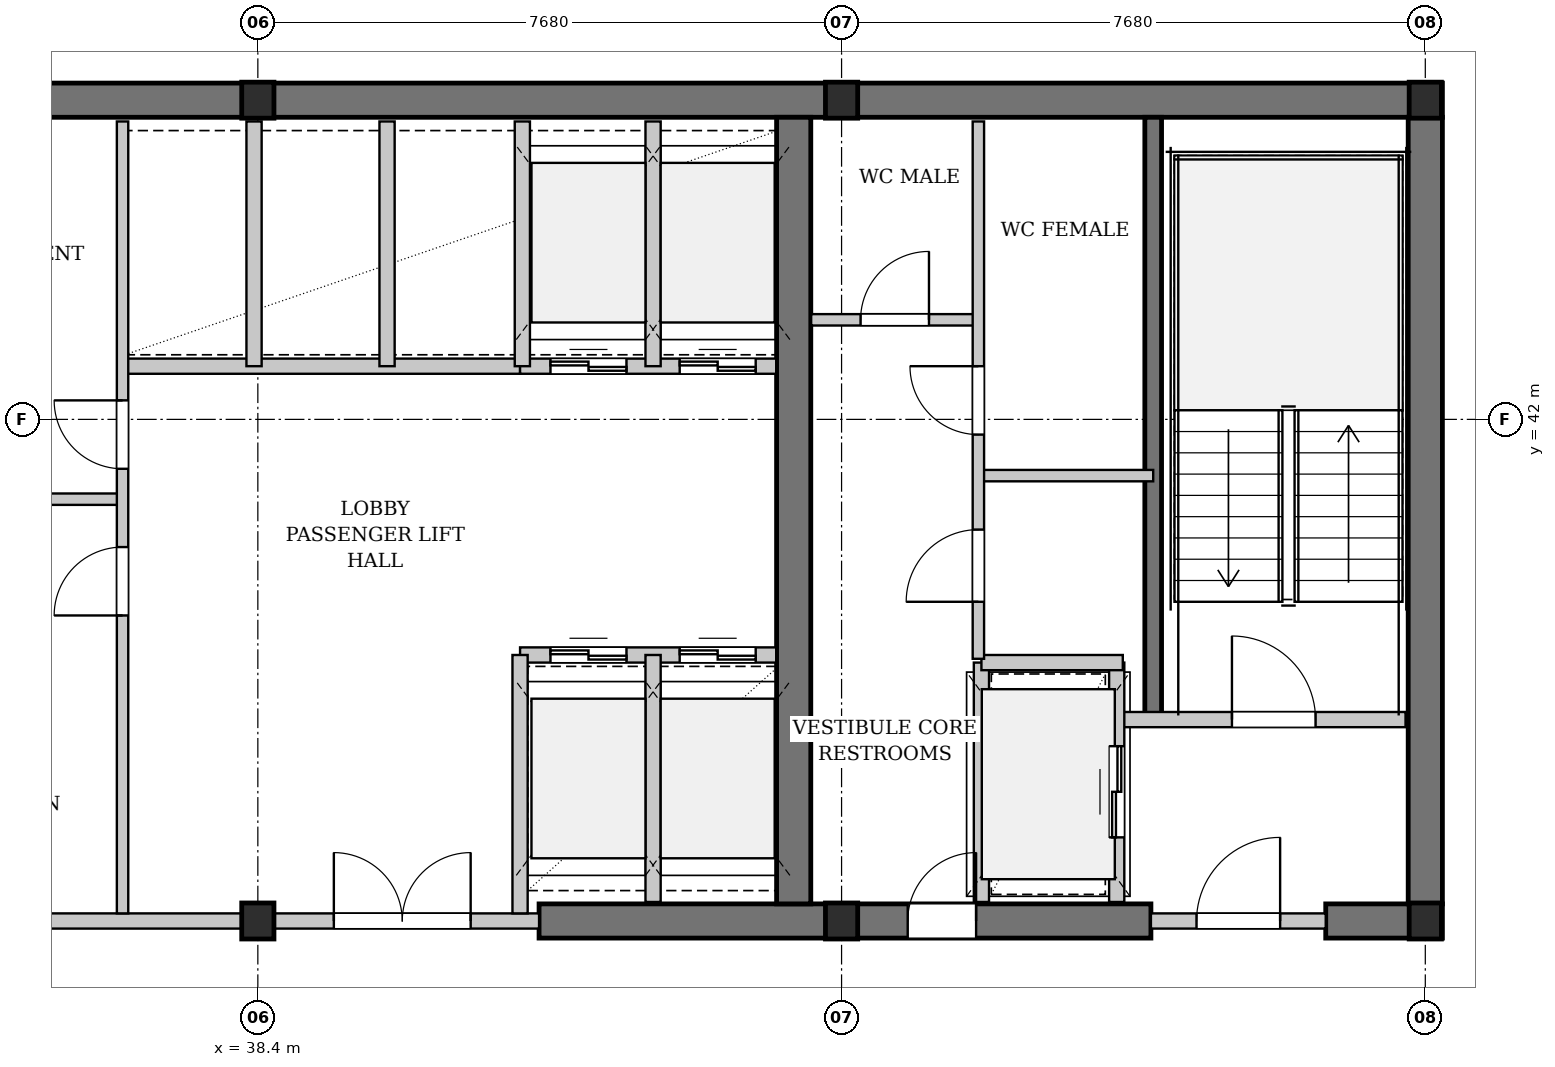
"""IFC4 building model, lengths in metres.
Left out: names, types, materials, properties, quantities, classifications, styles, units other than length and angle.
Written with IfcOpenShell. Run it as: python <this file> out.ifc"""

import sys

from ifc_helpers import new_model, si_unit, direction, frame, frame_2d, origin, origin_2d, place, context, subcontext, project, spatial, rectangle, i_section, extrude, element, fill, save


model = new_model("IFC4")
c1 = context("Model", 3, precision=1e-05, world=origin(), true_north=direction((0.0, 1.0)))
c2 = subcontext(c1, "Body", "Model", "MODEL_VIEW")
j1 = project(units=[si_unit("LENGTHUNIT", "METRE"), si_unit("PLANEANGLEUNIT", "RADIAN")], contexts=[c1])
p1 = place(None, origin())
s1 = spatial("IfcSite", under=j1, at=p1, CompositionType="ELEMENT")
p2 = place(p1, origin())
s2 = spatial("IfcBuilding", under=s1, at=p2, CompositionType="ELEMENT")
p3 = place(p2, frame((0.0, 0.0, 113.5)))
s3 = spatial("IfcBuildingStorey", under=s2, at=p3, CompositionType="ELEMENT", Elevation=113.5)
p4 = place(p3, frame((22.815, 46.2, 0.0), z_axis=(0.0, 0.0, 1.0), x_axis=(1.0, 0.0, 0.0)))
e1 = element("IfcWall", 1, at=p4, inside=s3, PredefinedType="SHEAR", context=c2, shape_type="SweptSolid", body=[
    extrude(rectangle(XDim=31.17, YDim=0.45, at=frame_2d((15.585, 0.0))), origin(), (0.0, 0.0, 1.0), 3.18),
])
p5 = place(p3, frame((42.1, 35.4, 0.0), z_axis=(0.0, 0.0, 1.0), x_axis=(1.0, 0.0, 0.0)))
e2 = element("IfcWall", 2, at=p5, inside=s3, PredefinedType="SHEAR", context=c2, shape_type="SweptSolid", body=[
    extrude(rectangle(XDim=8.05, YDim=0.45, at=frame_2d((4.025, 0.0))), origin(), (0.0, 0.0, 1.0), 3.18),
])
p6 = place(p5, frame((4.85, 0.0, 0.0)))
e3 = element("IfcOpeningElement", 3, at=p6, cuts=e2, PredefinedType="OPENING", context=c2, shape_type="SweptSolid", body=[
    extrude(rectangle(XDim=0.9, YDim=2.15, at=frame_2d((0.45, 1.075))), frame((0.0, 0.235, 0.0), z_axis=(0.0, -1.0, 0.0), x_axis=(1.0, 0.0, 0.0)), (0.0, 0.0, 1.0), 0.47),
])
p7 = place(p3, frame((52.45, 35.4, 0.0), z_axis=(0.0, 0.0, 1.0), x_axis=(1.0, 0.0, 0.0)))
e4 = element("IfcWall", 4, at=p7, inside=s3, PredefinedType="SHEAR", context=c2, shape_type="SweptSolid", body=[
    extrude(rectangle(XDim=1.535, YDim=0.45, at=frame_2d((0.768, 0.0))), origin(), (0.0, 0.0, 1.0), 3.18),
])
for number, where, z_axis, x_axis in (
    (5, (45.45, 35.625, 0.0), (0.0, 0.0, 1.0), (0.0, 1.0, 0.0)),
    (6, (53.76, 35.625, 0.0), (0.0, 0.0, 1.0), (0.0, 1.0, 0.0)),
):
    element("IfcWall", number, at=place(p3, frame(where, z_axis=z_axis, x_axis=x_axis)), inside=s3, PredefinedType="SHEAR", context=c2, shape_type="SweptSolid", body=[
        extrude(rectangle(XDim=10.35, YDim=0.45, at=frame_2d((5.175, 0.0))), origin(), (0.0, 0.0, 1.0), 3.18),
    ])
p8 = place(p3, frame((50.18, 38.05, 0.0), z_axis=(0.0, 0.0, 1.0), x_axis=(0.0, 1.0, 0.0)))
e7 = element("IfcWall", 7, at=p8, inside=s3, PredefinedType="SHEAR", context=c2, shape_type="SweptSolid", body=[
    extrude(rectangle(XDim=7.925, YDim=0.22, at=frame_2d((3.962, 0.0))), origin(), (0.0, 0.0, 1.0), 3.18),
])
for number, where, z_axis, x_axis in (
    (8, (38.4, 35.4, 0.0), (0.0, 0.0, 1.0), (1.0, 0.0, 0.0)),
    (9, (38.4, 46.2, 0.0), (0.0, 0.0, 1.0), (1.0, 0.0, 0.0)),
    (10, (46.08, 35.4, 0.0), (0.0, 0.0, 1.0), (1.0, 0.0, 0.0)),
    (11, (46.08, 46.2, 0.0), (0.0, 0.0, 1.0), (1.0, 0.0, 0.0)),
    (12, (53.76, 35.4, 0.0), (0.0, 0.0, 1.0), (1.0, 0.0, 0.0)),
    (13, (53.76, 46.2, 0.0), (0.0, 0.0, 1.0), (1.0, 0.0, 0.0)),
):
    element("IfcColumn", number, at=place(p3, frame(where, z_axis=z_axis, x_axis=x_axis)), inside=s3, PredefinedType="COLUMN", context=c2, shape_type="SweptSolid", body=[
        extrude(i_section(OverallWidth=0.424, OverallDepth=0.474, WebThickness=0.047, FlangeThickness=0.077, FilletRadius=0.015, at=origin_2d()), origin(), (0.0, 0.0, 1.0), 3.4),
    ])
p9 = place(p3, frame((35.6, 35.4, 0.0), z_axis=(0.0, 0.0, 1.0), x_axis=(1.0, 0.0, 0.0)))
e14 = element("IfcWall", 14, at=p9, inside=s3, PredefinedType="PARTITIONING", context=c2, shape_type="SweptSolid", body=[
    extrude(rectangle(XDim=6.5, YDim=0.2, at=frame_2d((3.25, 0.0))), origin(), (0.0, 0.0, 1.0), 2.525),
])
p10 = place(p9, frame((3.8, 0.0, 0.0)))
e15 = element("IfcOpeningElement", 15, at=p10, cuts=e14, PredefinedType="OPENING", context=c2, shape_type="SweptSolid", body=[
    extrude(rectangle(XDim=1.8, YDim=2.3, at=frame_2d((0.9, 1.15))), frame((0.0, 0.11, 0.0), z_axis=(0.0, -1.0, 0.0), x_axis=(1.0, 0.0, 0.0)), (0.0, 0.0, 1.0), 0.22),
])
p11 = place(p3, frame((36.6, 42.7, 0.0), z_axis=(0.0, 0.0, 1.0), x_axis=(1.0, 0.0, 0.0)))
e16 = element("IfcWall", 16, at=p11, inside=s3, PredefinedType="PARTITIONING", context=c2, shape_type="SweptSolid", body=[
    extrude(rectangle(XDim=5.25, YDim=0.2, at=frame_2d((2.625, 0.0))), origin(), (0.0, 0.0, 1.0), 3.18),
])
p12 = place(p3, frame((38.35, 42.7, 0.0), z_axis=(0.0, 0.0, 1.0), x_axis=(0.0, 1.0, 0.0)))
e17 = element("IfcWall", 17, at=p12, inside=s3, PredefinedType="PARTITIONING", context=c2, shape_type="SweptSolid", body=[
    extrude(rectangle(XDim=3.22, YDim=0.2, at=frame_2d((1.61, 0.0))), origin(), (0.0, 0.0, 1.0), 2.525),
])
p13 = place(p3, frame((40.1, 42.7, 0.0), z_axis=(0.0, 0.0, 1.0), x_axis=(0.0, 1.0, 0.0)))
e18 = element("IfcWall", 18, at=p13, inside=s3, PredefinedType="PARTITIONING", context=c2, shape_type="SweptSolid", body=[
    extrude(rectangle(XDim=3.22, YDim=0.2, at=frame_2d((1.61, 0.0))), origin(), (0.0, 0.0, 1.0), 3.18),
])
p14 = place(p3, frame((33.05, 40.95, 0.0), z_axis=(0.0, 0.0, 1.0), x_axis=(1.0, 0.0, 0.0)))
e19 = element("IfcWall", 19, at=p14, inside=s3, PredefinedType="PARTITIONING", context=c2, shape_type="SweptSolid", body=[
    extrude(rectangle(XDim=3.57, YDim=0.15, at=frame_2d((1.785, 0.0))), origin(), (0.0, 0.0, 1.0), 3.18),
])
p15 = place(p3, frame((36.62, 35.5, 0.0), z_axis=(0.0, 0.0, 1.0), x_axis=(0.0, 1.0, 0.0)))
e20 = element("IfcWall", 20, at=p15, inside=s3, PredefinedType="PARTITIONING", context=c2, shape_type="SweptSolid", body=[
    extrude(rectangle(XDim=10.42, YDim=0.15, at=frame_2d((5.21, 0.0))), origin(), (0.0, 0.0, 1.0), 3.18),
])
p16 = place(p15, frame((3.92, 0.0, 0.0)))
e21 = element("IfcOpeningElement", 21, at=p16, cuts=e20, PredefinedType="OPENING", context=c2, shape_type="SweptSolid", body=[
    extrude(rectangle(XDim=0.9, YDim=2.15, at=frame_2d((0.45, 1.075))), frame((0.0, 0.085, 0.0), z_axis=(0.0, -1.0, 0.0), x_axis=(1.0, 0.0, 0.0)), (0.0, 0.0, 1.0), 0.17),
])
p17 = place(p15, frame((5.85, 0.0, 0.0)))
e22 = element("IfcOpeningElement", 22, at=p17, cuts=e20, PredefinedType="OPENING", context=c2, shape_type="SweptSolid", body=[
    extrude(rectangle(XDim=0.9, YDim=2.15, at=frame_2d((0.45, 1.075))), frame((0.0, 0.085, 0.0), z_axis=(0.0, -1.0, 0.0), x_axis=(1.0, 0.0, 0.0)), (0.0, 0.0, 1.0), 0.17),
])
p18 = place(p3, frame((41.85, 38.9, 0.0), z_axis=(0.0, 0.0, 1.0), x_axis=(1.0, 0.0, 0.0)))
e23 = element("IfcWall", 23, at=p18, inside=s3, PredefinedType="PARTITIONING", context=c2, shape_type="SweptSolid", body=[
    extrude(rectangle(XDim=3.37, YDim=0.2, at=frame_2d((1.685, 0.0))), origin(), (0.0, 0.0, 1.0), 3.18),
])
p19 = place(p18, frame((0.4, 0.0, 0.0)))
e24 = element("IfcOpeningElement", 24, at=p19, cuts=e23, PredefinedType="OPENING", context=c2, shape_type="SweptSolid", body=[
    extrude(rectangle(XDim=1.0, YDim=2.2, at=frame_2d((0.5, 1.1))), frame((0.0, 0.11, 0.0), z_axis=(0.0, -1.0, 0.0), x_axis=(1.0, 0.0, 0.0)), (0.0, 0.0, 1.0), 0.22),
])
p20 = place(p18, frame((2.1, 0.0, 0.0)))
e25 = element("IfcOpeningElement", 25, at=p20, cuts=e23, PredefinedType="OPENING", context=c2, shape_type="SweptSolid", body=[
    extrude(rectangle(XDim=1.0, YDim=2.2, at=frame_2d((0.5, 1.1))), frame((0.0, 0.11, 0.0), z_axis=(0.0, -1.0, 0.0), x_axis=(1.0, 0.0, 0.0)), (0.0, 0.0, 1.0), 0.22),
])
p21 = place(p3, frame((41.85, 42.7, 0.0), z_axis=(0.0, 0.0, 1.0), x_axis=(1.0, 0.0, 0.0)))
e26 = element("IfcWall", 26, at=p21, inside=s3, PredefinedType="PARTITIONING", context=c2, shape_type="SweptSolid", body=[
    extrude(rectangle(XDim=3.37, YDim=0.2, at=frame_2d((1.685, 0.0))), origin(), (0.0, 0.0, 1.0), 3.18),
])
p22 = place(p21, frame((0.4, 0.0, 0.0)))
e27 = element("IfcOpeningElement", 27, at=p22, cuts=e26, PredefinedType="OPENING", context=c2, shape_type="SweptSolid", body=[
    extrude(rectangle(XDim=1.0, YDim=2.2, at=frame_2d((0.5, 1.1))), frame((0.0, 0.11, 0.0), z_axis=(0.0, -1.0, 0.0), x_axis=(1.0, 0.0, 0.0)), (0.0, 0.0, 1.0), 0.22),
])
p23 = place(p21, frame((2.1, 0.0, 0.0)))
e28 = element("IfcOpeningElement", 28, at=p23, cuts=e26, PredefinedType="OPENING", context=c2, shape_type="SweptSolid", body=[
    extrude(rectangle(XDim=1.0, YDim=2.2, at=frame_2d((0.5, 1.1))), frame((0.0, 0.11, 0.0), z_axis=(0.0, -1.0, 0.0), x_axis=(1.0, 0.0, 0.0)), (0.0, 0.0, 1.0), 0.22),
])
p24 = place(p3, frame((43.6, 35.65, 0.0), z_axis=(0.0, 0.0, 1.0), x_axis=(0.0, 1.0, 0.0)))
e29 = element("IfcWall", 29, at=p24, inside=s3, PredefinedType="PARTITIONING", context=c2, shape_type="SweptSolid", body=[
    extrude(rectangle(XDim=3.25, YDim=0.2, at=frame_2d((1.625, 0.0))), origin(), (0.0, 0.0, 1.0), 3.18),
])
p25 = place(p3, frame((43.6, 42.7, 0.0), z_axis=(0.0, 0.0, 1.0), x_axis=(0.0, 1.0, 0.0)))
e30 = element("IfcWall", 30, at=p25, inside=s3, PredefinedType="PARTITIONING", context=c2, shape_type="SweptSolid", body=[
    extrude(rectangle(XDim=3.22, YDim=0.2, at=frame_2d((1.61, 0.0))), origin(), (0.0, 0.0, 1.0), 3.18),
])
p26 = place(p3, frame((41.85, 35.5, 0.0), z_axis=(0.0, 0.0, 1.0), x_axis=(0.0, 1.0, 0.0)))
e31 = element("IfcWall", 31, at=p26, inside=s3, PredefinedType="PARTITIONING", context=c2, shape_type="SweptSolid", body=[
    extrude(rectangle(XDim=3.4, YDim=0.2, at=frame_2d((1.7, 0.0))), origin(), (0.0, 0.0, 1.0), 3.18),
])
p27 = place(p3, frame((41.88, 42.7, 0.0), z_axis=(0.0, 0.0, 1.0), x_axis=(0.0, 1.0, 0.0)))
e32 = element("IfcWall", 32, at=p27, inside=s3, PredefinedType="PARTITIONING", context=c2, shape_type="SweptSolid", body=[
    extrude(rectangle(XDim=3.22, YDim=0.2, at=frame_2d((1.61, 0.0))), origin(), (0.0, 0.0, 1.0), 3.18),
])
p28 = place(p3, frame((49.78, 38.05, 0.0), z_axis=(0.0, 0.0, 1.0), x_axis=(1.0, 0.0, 0.0)))
e33 = element("IfcWall", 33, at=p28, inside=s3, PredefinedType="PARTITIONING", context=c2, shape_type="SweptSolid", body=[
    extrude(rectangle(XDim=3.72, YDim=0.2, at=frame_2d((1.86, 0.0))), origin(), (0.0, 0.0, 1.0), 3.18),
])
p29 = place(p28, frame((1.436, 0.0, 0.0)))
e34 = element("IfcOpeningElement", 34, at=p29, cuts=e33, PredefinedType="OPENING", context=c2, shape_type="SweptSolid", body=[
    extrude(rectangle(XDim=1.1, YDim=2.15, at=frame_2d((0.55, 1.075))), frame((0.0, 0.11, 0.0), z_axis=(0.0, -1.0, 0.0), x_axis=(1.0, 0.0, 0.0)), (0.0, 0.0, 1.0), 0.22),
])
p30 = place(p3, frame((50.15, 35.4, 0.0), z_axis=(0.0, 0.0, 1.0), x_axis=(1.0, 0.0, 0.0)))
e35 = element("IfcWall", 35, at=p30, inside=s3, PredefinedType="PARTITIONING", context=c2, shape_type="SweptSolid", body=[
    extrude(rectangle(XDim=2.3, YDim=0.2, at=frame_2d((1.15, 0.0))), origin(), (0.0, 0.0, 1.0), 2.525),
])
p31 = place(p30, frame((0.6, 0.0, 0.0)))
e36 = element("IfcOpeningElement", 36, at=p31, cuts=e35, PredefinedType="OPENING", context=c2, shape_type="SweptSolid", body=[
    extrude(rectangle(XDim=1.1, YDim=2.15, at=frame_2d((0.55, 1.075))), frame((0.0, 0.11, 0.0), z_axis=(0.0, -1.0, 0.0), x_axis=(1.0, 0.0, 0.0)), (0.0, 0.0, 1.0), 0.22),
])
p32 = place(p3, frame((49.7, 35.65, 0.0), z_axis=(0.0, 0.0, 1.0), x_axis=(0.0, 1.0, 0.0)))
e37 = element("IfcWall", 37, at=p32, inside=s3, PredefinedType="PARTITIONING", context=c2, shape_type="SweptSolid", body=[
    extrude(rectangle(XDim=3.15, YDim=0.2, at=frame_2d((1.575, 0.0))), origin(), (0.0, 0.0, 1.0), 3.18),
])
p33 = place(p32, frame((0.85, 0.0, 0.0)))
e38 = element("IfcOpeningElement", 38, at=p33, cuts=e37, PredefinedType="OPENING", context=c2, shape_type="SweptSolid", body=[
    extrude(rectangle(XDim=1.2, YDim=2.2, at=frame_2d((0.6, 1.1))), frame((0.0, 0.11, 0.0), z_axis=(0.0, -1.0, 0.0), x_axis=(1.0, 0.0, 0.0)), (0.0, 0.0, 1.0), 0.22),
])
p34 = place(p3, frame((47.92, 35.65, 0.0), z_axis=(0.0, 0.0, 1.0), x_axis=(0.0, 1.0, 0.0)))
e39 = element("IfcWall", 39, at=p34, inside=s3, PredefinedType="PARTITIONING", context=c2, shape_type="SweptSolid", body=[
    extrude(rectangle(XDim=3.15, YDim=0.2, at=frame_2d((1.575, 0.0))), origin(), (0.0, 0.0, 1.0), 3.18),
])
p35 = place(p3, frame((47.92, 38.8, 0.0), z_axis=(0.0, 0.0, 1.0), x_axis=(1.0, 0.0, 0.0)))
e40 = element("IfcWall", 40, at=p35, inside=s3, PredefinedType="PARTITIONING", context=c2, shape_type="SweptSolid", body=[
    extrude(rectangle(XDim=1.86, YDim=0.2, at=frame_2d((0.93, 0.0))), origin(), (0.0, 0.0, 1.0), 3.18),
])
p36 = place(p3, frame((45.68, 43.31, 0.0), z_axis=(0.0, 0.0, 1.0), x_axis=(1.0, 0.0, 0.0)))
e41 = element("IfcWall", 41, at=p36, inside=s3, PredefinedType="PARTITIONING", context=c2, shape_type="SweptSolid", body=[
    extrude(rectangle(XDim=2.2, YDim=0.15, at=frame_2d((1.1, 0.0))), origin(), (0.0, 0.0, 1.0), 3.18),
])
p37 = place(p36, frame((0.65, 0.0, 0.0)))
e42 = element("IfcOpeningElement", 42, at=p37, cuts=e41, PredefinedType="OPENING", context=c2, shape_type="SweptSolid", body=[
    extrude(rectangle(XDim=0.9, YDim=2.15, at=frame_2d((0.45, 1.075))), frame((0.0, 0.085, 0.0), z_axis=(0.0, -1.0, 0.0), x_axis=(1.0, 0.0, 0.0)), (0.0, 0.0, 1.0), 0.17),
])
p38 = place(p3, frame((47.88, 41.26, 0.0), z_axis=(0.0, 0.0, 1.0), x_axis=(1.0, 0.0, 0.0)))
e43 = element("IfcWall", 43, at=p38, inside=s3, PredefinedType="PARTITIONING", context=c2, shape_type="SweptSolid", body=[
    extrude(rectangle(XDim=2.3, YDim=0.15, at=frame_2d((1.15, 0.0))), origin(), (0.0, 0.0, 1.0), 3.18),
])
p39 = place(p3, frame((47.88, 38.85, 0.0), z_axis=(0.0, 0.0, 1.0), x_axis=(0.0, 1.0, 0.0)))
e44 = element("IfcWall", 44, at=p39, inside=s3, PredefinedType="PARTITIONING", context=c2, shape_type="SweptSolid", body=[
    extrude(rectangle(XDim=7.07, YDim=0.15, at=frame_2d((3.535, 0.0))), origin(), (0.0, 0.0, 1.0), 3.18),
])
p40 = place(p39, frame((0.75, 0.0, 0.0)))
e45 = element("IfcOpeningElement", 45, at=p40, cuts=e44, PredefinedType="OPENING", context=c2, shape_type="SweptSolid", body=[
    extrude(rectangle(XDim=0.95, YDim=2.15, at=frame_2d((0.475, 1.075))), frame((0.0, 0.085, 0.0), z_axis=(0.0, -1.0, 0.0), x_axis=(1.0, 0.0, 0.0)), (0.0, 0.0, 1.0), 0.17),
])
p41 = place(p39, frame((2.95, 0.0, 0.0)))
e46 = element("IfcOpeningElement", 46, at=p41, cuts=e44, PredefinedType="OPENING", context=c2, shape_type="SweptSolid", body=[
    extrude(rectangle(XDim=0.9, YDim=2.15, at=frame_2d((0.45, 1.075))), frame((0.0, 0.085, 0.0), z_axis=(0.0, -1.0, 0.0), x_axis=(1.0, 0.0, 0.0)), (0.0, 0.0, 1.0), 0.17),
])
p42 = place(p10, origin())
e47 = element("IfcDoor", 47, at=p42, inside=s3, OperationType="DOUBLE_DOOR_SINGLE_SWING", PredefinedType="DOOR", context=c2, shape_type="SweptSolid", body=[
    extrude(rectangle(XDim=1.8, YDim=2.3, at=frame_2d((0.9, 1.15))), frame((0.0, 0.025, 0.0), z_axis=(0.0, -1.0, 0.0), x_axis=(1.0, 0.0, 0.0)), (0.0, 0.0, 1.0), 0.05),
])
fill(e15, e47)
p43 = place(p16, origin())
e48 = element("IfcDoor", 48, at=p43, inside=s3, OperationType="SINGLE_SWING_LEFT", PredefinedType="DOOR", context=c2, shape_type="SweptSolid", body=[
    extrude(rectangle(XDim=0.9, YDim=2.15, at=frame_2d((0.45, 1.075))), frame((0.0, 0.025, 0.0), z_axis=(0.0, -1.0, 0.0), x_axis=(1.0, 0.0, 0.0)), (0.0, 0.0, 1.0), 0.05),
])
fill(e21, e48)
p44 = place(p17, origin())
e49 = element("IfcDoor", 49, at=p44, inside=s3, OperationType="SINGLE_SWING_RIGHT", PredefinedType="DOOR", context=c2, shape_type="SweptSolid", body=[
    extrude(rectangle(XDim=0.9, YDim=2.15, at=frame_2d((0.45, 1.075))), frame((0.0, 0.025, 0.0), z_axis=(0.0, -1.0, 0.0), x_axis=(1.0, 0.0, 0.0)), (0.0, 0.0, 1.0), 0.05),
])
fill(e22, e49)
p45 = place(p19, origin())
e50 = element("IfcDoor", 50, at=p45, inside=s3, OperationType="DOUBLE_DOOR_SLIDING", PredefinedType="DOOR", context=c2, shape_type="SweptSolid", body=[
    extrude(rectangle(XDim=1.0, YDim=2.2, at=frame_2d((0.5, 1.1))), frame((0.0, 0.025, 0.0), z_axis=(0.0, -1.0, 0.0), x_axis=(1.0, 0.0, 0.0)), (0.0, 0.0, 1.0), 0.05),
])
fill(e24, e50)
p46 = place(p20, origin())
e51 = element("IfcDoor", 51, at=p46, inside=s3, OperationType="DOUBLE_DOOR_SLIDING", PredefinedType="DOOR", context=c2, shape_type="SweptSolid", body=[
    extrude(rectangle(XDim=1.0, YDim=2.2, at=frame_2d((0.5, 1.1))), frame((0.0, 0.025, 0.0), z_axis=(0.0, -1.0, 0.0), x_axis=(1.0, 0.0, 0.0)), (0.0, 0.0, 1.0), 0.05),
])
fill(e25, e51)
p47 = place(p22, origin())
e52 = element("IfcDoor", 52, at=p47, inside=s3, OperationType="DOUBLE_DOOR_SLIDING", PredefinedType="DOOR", context=c2, shape_type="SweptSolid", body=[
    extrude(rectangle(XDim=1.0, YDim=2.2, at=frame_2d((0.5, 1.1))), frame((0.0, 0.025, 0.0), z_axis=(0.0, -1.0, 0.0), x_axis=(1.0, 0.0, 0.0)), (0.0, 0.0, 1.0), 0.05),
])
fill(e27, e52)
p48 = place(p23, origin())
e53 = element("IfcDoor", 53, at=p48, inside=s3, OperationType="DOUBLE_DOOR_SLIDING", PredefinedType="DOOR", context=c2, shape_type="SweptSolid", body=[
    extrude(rectangle(XDim=1.0, YDim=2.2, at=frame_2d((0.5, 1.1))), frame((0.0, 0.025, 0.0), z_axis=(0.0, -1.0, 0.0), x_axis=(1.0, 0.0, 0.0)), (0.0, 0.0, 1.0), 0.05),
])
fill(e28, e53)
p49 = place(p29, origin())
e54 = element("IfcDoor", 54, at=p49, inside=s3, OperationType="SINGLE_SWING_LEFT", PredefinedType="DOOR", context=c2, shape_type="SweptSolid", body=[
    extrude(rectangle(XDim=1.1, YDim=2.15, at=frame_2d((0.55, 1.075))), frame((0.0, 0.025, 0.0), z_axis=(0.0, -1.0, 0.0), x_axis=(1.0, 0.0, 0.0)), (0.0, 0.0, 1.0), 0.05),
])
fill(e34, e54)
p50 = place(p31, origin())
e55 = element("IfcDoor", 55, at=p50, inside=s3, OperationType="SINGLE_SWING_RIGHT", PredefinedType="DOOR", context=c2, shape_type="SweptSolid", body=[
    extrude(rectangle(XDim=1.1, YDim=2.15, at=frame_2d((0.55, 1.075))), frame((0.0, 0.025, 0.0), z_axis=(0.0, -1.0, 0.0), x_axis=(1.0, 0.0, 0.0)), (0.0, 0.0, 1.0), 0.05),
])
fill(e36, e55)
p51 = place(p33, origin())
e56 = element("IfcDoor", 56, at=p51, inside=s3, OperationType="DOUBLE_DOOR_SLIDING", PredefinedType="DOOR", context=c2, shape_type="SweptSolid", body=[
    extrude(rectangle(XDim=1.2, YDim=2.2, at=frame_2d((0.6, 1.1))), frame((0.0, 0.025, 0.0), z_axis=(0.0, -1.0, 0.0), x_axis=(1.0, 0.0, 0.0)), (0.0, 0.0, 1.0), 0.05),
])
fill(e38, e56)
p52 = place(p37, origin())
e57 = element("IfcDoor", 57, at=p52, inside=s3, OperationType="SINGLE_SWING_RIGHT", PredefinedType="DOOR", context=c2, shape_type="SweptSolid", body=[
    extrude(rectangle(XDim=0.9, YDim=2.15, at=frame_2d((0.45, 1.075))), frame((0.0, 0.025, 0.0), z_axis=(0.0, -1.0, 0.0), x_axis=(1.0, 0.0, 0.0)), (0.0, 0.0, 1.0), 0.05),
])
fill(e42, e57)
p53 = place(p40, origin())
e58 = element("IfcDoor", 58, at=p53, inside=s3, OperationType="SINGLE_SWING_LEFT", PredefinedType="DOOR", context=c2, shape_type="SweptSolid", body=[
    extrude(rectangle(XDim=0.95, YDim=2.15, at=frame_2d((0.475, 1.075))), frame((0.0, 0.025, 0.0), z_axis=(0.0, -1.0, 0.0), x_axis=(1.0, 0.0, 0.0)), (0.0, 0.0, 1.0), 0.05),
])
fill(e45, e58)
p54 = place(p41, origin())
e59 = element("IfcDoor", 59, at=p54, inside=s3, OperationType="SINGLE_SWING_RIGHT", PredefinedType="DOOR", context=c2, shape_type="SweptSolid", body=[
    extrude(rectangle(XDim=0.9, YDim=2.15, at=frame_2d((0.45, 1.075))), frame((0.0, 0.025, 0.0), z_axis=(0.0, -1.0, 0.0), x_axis=(1.0, 0.0, 0.0)), (0.0, 0.0, 1.0), 0.05),
])
fill(e46, e59)
p55 = place(p6, origin())
e60 = element("IfcDoor", 60, at=p55, inside=s3, OperationType="SINGLE_SWING_RIGHT", PredefinedType="DOOR", context=c2, shape_type="SweptSolid", body=[
    extrude(rectangle(XDim=0.9, YDim=2.15, at=frame_2d((0.45, 1.075))), frame((0.0, 0.025, 0.0), z_axis=(0.0, -1.0, 0.0), x_axis=(1.0, 0.0, 0.0)), (0.0, 0.0, 1.0), 0.05),
])
fill(e3, e60)
save(model, sys.argv[1])
